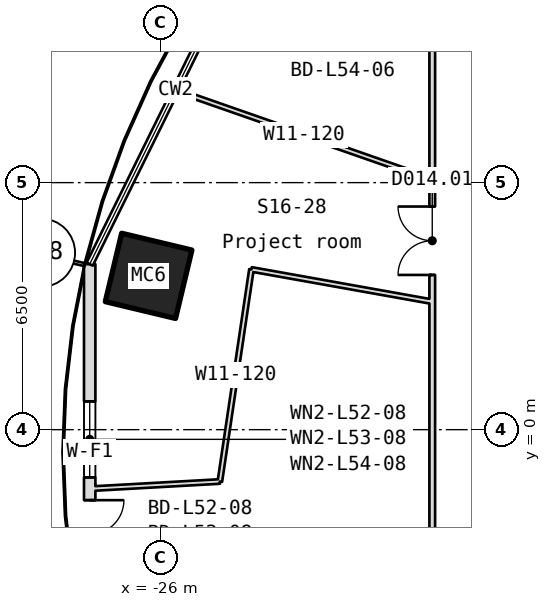
"""IFC4 building model, lengths in metres.
Left out: names, types, materials, properties, quantities, classifications, styles, units other than length and angle.
Written with IfcOpenShell. Run it as: python <this file> out.ifc"""

import sys

from ifc_helpers import new_model, si_unit, direction, frame, frame_2d, origin, origin_2d, place, context, subcontext, project, spatial, rectangle, hollow_rectangle, extrude, element, fill, save


model = new_model("IFC4")
c1 = context("Model", 3, precision=1e-05, world=origin(), true_north=direction((0.0, 1.0)))
c2 = subcontext(c1, "Body", "Model", "MODEL_VIEW")
j1 = project(units=[si_unit("LENGTHUNIT", "METRE"), si_unit("PLANEANGLEUNIT", "RADIAN")], contexts=[c1])
p1 = place(None, origin())
s1 = spatial("IfcSite", under=j1, at=p1, CompositionType="ELEMENT")
p2 = place(p1, origin())
s2 = spatial("IfcBuilding", under=s1, at=p2, CompositionType="ELEMENT")
p3 = place(p2, frame((0.0, 0.0, 235.75)))
s3 = spatial("IfcBuildingStorey", under=s2, at=p3, CompositionType="ELEMENT", Elevation=235.75)
p4 = place(p3, frame((-26.314, 4.047, -0.18), z_axis=(0.0, 0.0, 1.0), x_axis=(0.232803807157, 0.972523720725, 0.0)))
e1 = element("IfcColumn", 1, at=p4, inside=s3, PredefinedType="COLUMN", context=c2, shape_type="SweptSolid", body=[
    extrude(hollow_rectangle(XDim=1.85, YDim=1.9, WallThickness=0.065, at=origin_2d()), origin(), (0.0, 0.0, 1.0), 4.15),
])
p5 = place(p3, frame((-27.864, 4.355, 0.0), z_axis=(0.0, 0.0, 1.0), x_axis=(0.0, -1.0, 0.0)))
e2 = element("IfcWall", 2, at=p5, inside=s3, PredefinedType="SOLIDWALL", context=c2, shape_type="SweptSolid", body=[
    extrude(rectangle(XDim=9.91, YDim=0.3, at=frame_2d((4.955, 0.0))), origin(), (0.0, 0.0, 1.0), 3.97),
])
p6 = place(p5, frame((6.21, 0.0, 0.0)))
e3 = element("IfcOpeningElement", 3, at=p6, cuts=e2, PredefinedType="OPENING", context=c2, shape_type="SweptSolid", body=[
    extrude(rectangle(XDim=1.8, YDim=2.4, at=frame_2d((0.9, 1.2))), frame((0.0, 0.16, 0.0), z_axis=(0.0, -1.0, 0.0), x_axis=(1.0, 0.0, 0.0)), (0.0, 0.0, 1.0), 0.32),
])
p7 = place(p5, frame((3.61, 0.0, 0.9)))
e4 = element("IfcOpeningElement", 4, at=p7, cuts=e2, PredefinedType="OPENING", context=c2, shape_type="SweptSolid", body=[
    extrude(rectangle(XDim=2.0, YDim=1.5, at=frame_2d((1.0, 0.75))), frame((0.0, 0.16, 0.0), z_axis=(0.0, -1.0, 0.0), x_axis=(1.0, 0.0, 0.0)), (0.0, 0.0, 1.0), 0.32),
])
p8 = place(p3, frame((-24.439, -1.364, 0.0), z_axis=(0.0, 0.0, 1.0), x_axis=(-0.998446307291, -0.055722270749, 0.0)))
e5 = element("IfcWall", 5, at=p8, inside=s3, PredefinedType="PARTITIONING", context=c2, shape_type="SweptSolid", body=[
    extrude(rectangle(XDim=3.431, YDim=0.12, at=frame_2d((1.715, 0.0))), origin(), (0.0, 0.0, 1.0), 3.97),
])
p9 = place(p3, frame((-23.608, 4.217, 0.0), z_axis=(0.0, 0.0, 1.0), x_axis=(-0.14729509075, -0.98909259235, 0.0)))
e6 = element("IfcWall", 6, at=p9, inside=s3, PredefinedType="PARTITIONING", context=c2, shape_type="SweptSolid", body=[
    extrude(rectangle(XDim=5.642, YDim=0.12, at=frame_2d((2.821, 0.0))), origin(), (0.0, 0.0, 1.0), 3.97),
])
p10 = place(p3, frame((-23.608, 4.217, 0.0), z_axis=(0.0, 0.0, 1.0), x_axis=(0.984417270676, -0.175848335774, 0.0)))
e7 = element("IfcWall", 7, at=p10, inside=s3, PredefinedType="PARTITIONING", context=c2, shape_type="SweptSolid", body=[
    extrude(rectangle(XDim=4.833, YDim=0.12, at=frame_2d((2.417, 0.0))), origin(), (0.0, 0.0, 1.0), 3.97),
])
p11 = place(p3, frame((-18.85, -15.85, 0.0), z_axis=(0.0, 0.0, 1.0), x_axis=(0.0, 1.0, 0.0)))
e8 = element("IfcWall", 8, at=p11, inside=s3, PredefinedType="PARTITIONING", context=c2, shape_type="SweptSolid", body=[
    extrude(rectangle(XDim=30.176, YDim=0.15, at=frame_2d((15.088, 0.0))), origin(), (0.0, 0.0, 1.0), 3.97),
])
p12 = place(p11, frame((19.921, 0.0, 0.0)))
e9 = element("IfcOpeningElement", 9, at=p12, cuts=e8, PredefinedType="OPENING", context=c2, shape_type="SweptSolid", body=[
    extrude(rectangle(XDim=1.8, YDim=2.1, at=frame_2d((0.9, 1.05))), frame((0.0, 0.085, 0.0), z_axis=(0.0, -1.0, 0.0), x_axis=(1.0, 0.0, 0.0)), (0.0, 0.0, 1.0), 0.17),
])
p13 = place(p3, frame((-18.85, 6.576, 0.0), z_axis=(0.0, 0.0, 1.0), x_axis=(-0.944186113953, 0.329412480362, 0.0)))
e10 = element("IfcWall", 10, at=p13, inside=s3, PredefinedType="PARTITIONING", context=c2, shape_type="SweptSolid", body=[
    extrude(rectangle(XDim=7.155, YDim=0.12, at=frame_2d((3.578, 0.0))), origin(), (0.0, 0.0, 1.0), 3.97),
])
p14 = place(p6, origin())
e11 = element("IfcDoor", 11, at=p14, inside=s3, OperationType="SINGLE_SWING_LEFT", PredefinedType="DOOR", context=c2, shape_type="SweptSolid", body=[
    extrude(rectangle(XDim=1.8, YDim=2.4, at=frame_2d((0.9, 1.2))), frame((0.0, 0.025, 0.0), z_axis=(0.0, -1.0, 0.0), x_axis=(1.0, 0.0, 0.0)), (0.0, 0.0, 1.0), 0.05),
])
fill(e3, e11)
p15 = place(p7, origin())
e12 = element("IfcWindow", 12, at=p15, inside=s3, PartitioningType="SINGLE_PANEL", PredefinedType="WINDOW", context=c2, shape_type="SweptSolid", body=[
    extrude(rectangle(XDim=2.0, YDim=1.5, at=frame_2d((1.0, 0.75))), frame((0.0, 0.03, 0.0), z_axis=(0.0, -1.0, 0.0), x_axis=(1.0, 0.0, 0.0)), (0.0, 0.0, 1.0), 0.06),
])
fill(e4, e12)
p16 = place(p12, origin())
e13 = element("IfcDoor", 13, at=p16, inside=s3, OperationType="DOUBLE_DOOR_SINGLE_SWING", PredefinedType="DOOR", context=c2, shape_type="SweptSolid", body=[
    extrude(rectangle(XDim=1.8, YDim=2.1, at=frame_2d((0.9, 1.05))), frame((0.0, 0.025, 0.0), z_axis=(0.0, -1.0, 0.0), x_axis=(1.0, 0.0, 0.0)), (0.0, 0.0, 1.0), 0.05),
])
fill(e9, e13)
save(model, sys.argv[1])
